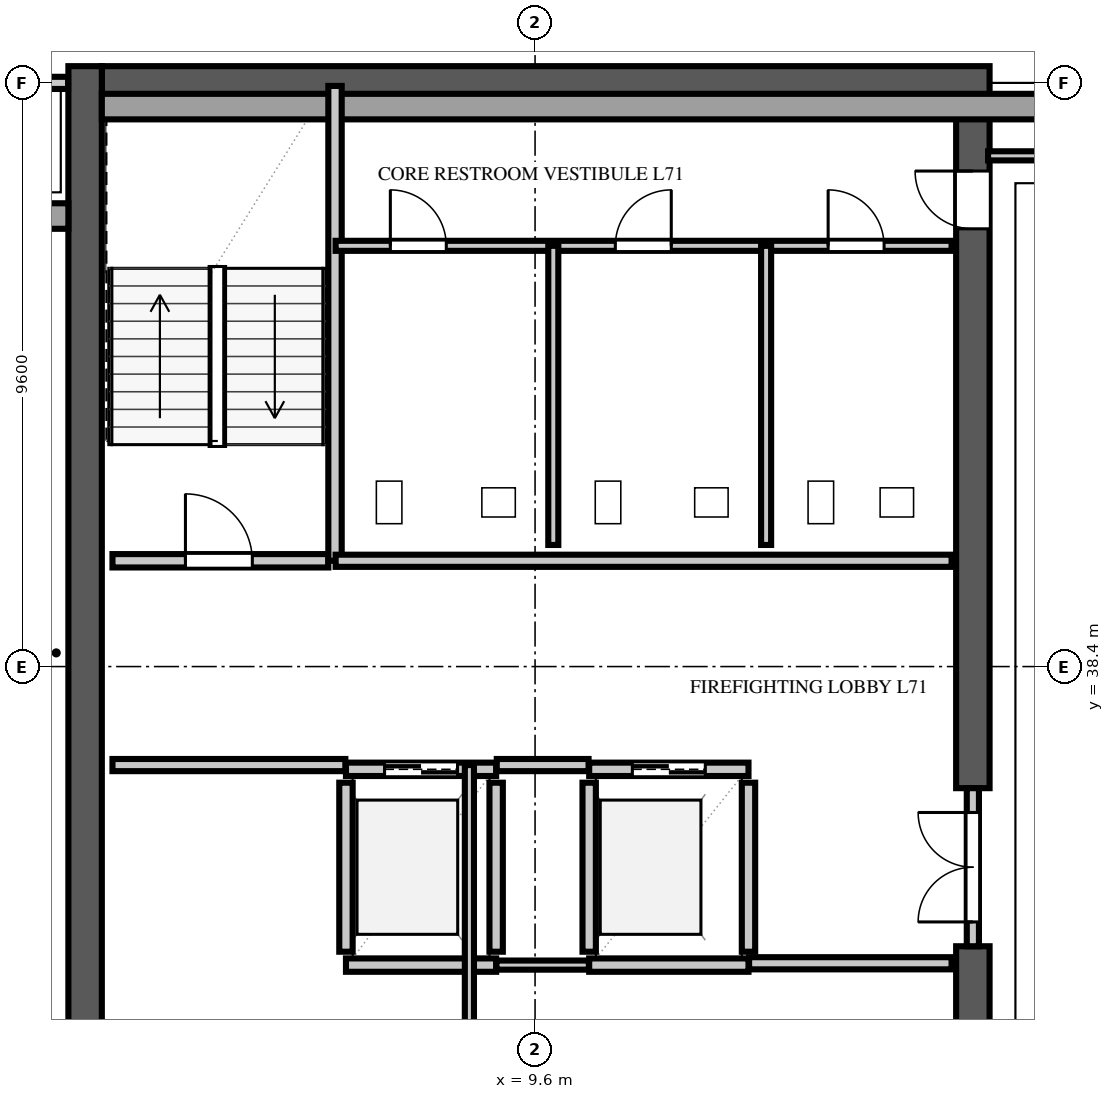
"""IFC4 building model, lengths in metres.
Left out: names, types, materials, properties, quantities, classifications, styles, units other than length and angle.
Written with IfcOpenShell. Run it as: python <this file> out.ifc"""

import sys

from ifc_helpers import new_model, si_unit, direction, frame, frame_2d, origin, place, context, subcontext, project, spatial, rectangle, extrude, element, fill, save


model = new_model("IFC4")
c1 = context("Model", 3, precision=1e-05, world=origin(), true_north=direction((0.0, 1.0)))
c2 = subcontext(c1, "Body", "Model", "MODEL_VIEW")
j1 = project(units=[si_unit("LENGTHUNIT", "METRE"), si_unit("PLANEANGLEUNIT", "RADIAN")], contexts=[c1])
p1 = place(None, origin())
s1 = spatial("IfcSite", under=j1, at=p1, CompositionType="ELEMENT")
p2 = place(p1, origin())
s2 = spatial("IfcBuilding", under=s1, at=p2, CompositionType="ELEMENT")
p3 = place(p2, frame((0.0, 0.0, 281.0)))
s3 = spatial("IfcBuildingStorey", under=s2, at=p3, CompositionType="ELEMENT", Elevation=281.0)
p4 = place(p3, frame((2.475, 48.0, 0.0), z_axis=(0.0, 0.0, 1.0), x_axis=(1.0, 0.0, 0.0)))
e1 = element("IfcWall", 1, at=p4, inside=s3, PredefinedType="SHEAR", context=c2, shape_type="SweptSolid", body=[
    extrude(rectangle(XDim=14.6, YDim=0.55, at=frame_2d((7.3, 0.0))), origin(), (0.0, 0.0, 1.0), 3.54),
])
p5 = place(p3, frame((2.2, 9.325, 0.0), z_axis=(0.0, 0.0, 1.0), x_axis=(0.0, 1.0, 0.0)))
e2 = element("IfcWall", 2, at=p5, inside=s3, PredefinedType="SHEAR", context=c2, shape_type="SweptSolid", body=[
    extrude(rectangle(XDim=38.95, YDim=0.55, at=frame_2d((19.475, 0.0))), origin(), (0.0, 0.0, 1.0), 3.54),
])
p6 = place(p3, frame((16.8, 26.0, 0.0), z_axis=(0.0, 0.0, 1.0), x_axis=(0.0, 1.0, 0.0)))
e3 = element("IfcWall", 3, at=p6, inside=s3, PredefinedType="SHEAR", context=c2, shape_type="SweptSolid", body=[
    extrude(rectangle(XDim=7.8, YDim=0.55, at=frame_2d((3.9, 0.0))), origin(), (0.0, 0.0, 1.0), 3.54),
])
p7 = place(p3, frame((16.8, 36.4, 0.0), z_axis=(0.0, 0.0, 1.0), x_axis=(0.0, 1.0, 0.0)))
e4 = element("IfcWall", 4, at=p7, inside=s3, PredefinedType="SHEAR", context=c2, shape_type="SweptSolid", body=[
    extrude(rectangle(XDim=11.325, YDim=0.55, at=frame_2d((5.663, 0.0))), origin(), (0.0, 0.0, 1.0), 3.54),
])
p8 = place(p7, frame((9.2, 0.0, 0.0)))
e5 = element("IfcOpeningElement", 5, at=p8, cuts=e4, PredefinedType="OPENING", context=c2, shape_type="SweptSolid", body=[
    extrude(rectangle(XDim=0.95, YDim=2.15, at=frame_2d((0.475, 1.075))), frame((0.0, 0.287, 0.0), z_axis=(0.0, -1.0, 0.0), x_axis=(1.0, 0.0, 0.0)), (0.0, 0.0, 1.0), 0.574),
])
p9 = place(p3, frame((36.56, 47.61, 0.0), z_axis=(0.0, 0.0, 1.0), x_axis=(-1.0, 0.0, 0.0)))
e6 = element("IfcWall", 6, at=p9, inside=s3, PredefinedType="SOLIDWALL", context=c2, shape_type="SweptSolid", body=[
    extrude(rectangle(XDim=34.085, YDim=0.42, at=frame_2d((17.042, 0.0))), origin(), (0.0, 0.0, 1.0), 3.54),
])
p10 = place(p9, frame((4.885, 0.0, 0.9)))
e7 = element("IfcOpeningElement", 7, at=p10, cuts=e6, PredefinedType="OPENING", context=c2, shape_type="SweptSolid", body=[
    extrude(rectangle(XDim=0.95, YDim=1.85, at=frame_2d((0.475, 0.925))), frame((0.0, 0.222, 0.0), z_axis=(0.0, -1.0, 0.0), x_axis=(1.0, 0.0, 0.0)), (0.0, 0.0, 1.0), 0.444),
])
p11 = place(p9, frame((9.41, 0.0, 0.9)))
e8 = element("IfcOpeningElement", 8, at=p11, cuts=e6, PredefinedType="OPENING", context=c2, shape_type="SweptSolid", body=[
    extrude(rectangle(XDim=1.5, YDim=1.85, at=frame_2d((0.75, 0.925))), frame((0.0, 0.222, 0.0), z_axis=(0.0, -1.0, 0.0), x_axis=(1.0, 0.0, 0.0)), (0.0, 0.0, 1.0), 0.444),
])
p12 = place(p9, frame((14.485, 0.0, 0.9)))
e9 = element("IfcOpeningElement", 9, at=p12, cuts=e6, PredefinedType="OPENING", context=c2, shape_type="SweptSolid", body=[
    extrude(rectangle(XDim=0.95, YDim=1.85, at=frame_2d((0.475, 0.925))), frame((0.0, 0.222, 0.0), z_axis=(0.0, -1.0, 0.0), x_axis=(1.0, 0.0, 0.0)), (0.0, 0.0, 1.0), 0.444),
])
p13 = place(p3, frame((1.925, 45.81, 0.0), z_axis=(0.0, 0.0, 1.0), x_axis=(-1.0, 0.0, 0.0)))
e10 = element("IfcWall", 10, at=p13, inside=s3, PredefinedType="SOLIDWALL", context=c2, shape_type="SweptSolid", body=[
    extrude(rectangle(XDim=1.885, YDim=0.42, at=frame_2d((0.942, 0.0))), origin(), (0.0, 0.0, 1.0), 3.54),
])
p14 = place(p3, frame((2.65, 40.14, 0.0), z_axis=(0.0, 0.0, 1.0), x_axis=(1.0, 0.0, 0.0)))
e11 = element("IfcWall", 11, at=p14, inside=s3, PredefinedType="SOLIDWALL", context=c2, shape_type="SweptSolid", body=[
    extrude(rectangle(XDim=3.55, YDim=0.22, at=frame_2d((1.775, 0.0))), origin(), (0.0, 0.0, 1.0), 3.54),
])
p15 = place(p14, frame((1.2, 0.0, 0.0)))
e12 = element("IfcOpeningElement", 12, at=p15, cuts=e11, PredefinedType="OPENING", context=c2, shape_type="SweptSolid", body=[
    extrude(rectangle(XDim=1.1, YDim=2.2, at=frame_2d((0.55, 1.1))), frame((0.0, 0.122, 0.0), z_axis=(0.0, -1.0, 0.0), x_axis=(1.0, 0.0, 0.0)), (0.0, 0.0, 1.0), 0.244),
])
p16 = place(p3, frame((6.31, 40.14, 0.0), z_axis=(0.0, 0.0, 1.0), x_axis=(0.0, 1.0, 0.0)))
e13 = element("IfcWall", 13, at=p16, inside=s3, PredefinedType="SOLIDWALL", context=c2, shape_type="SweptSolid", body=[
    extrude(rectangle(XDim=7.81, YDim=0.22, at=frame_2d((3.905, 0.0))), origin(), (0.0, 0.0, 1.0), 3.54),
])
for number, where, z_axis, x_axis in (
    (14, (6.49, 33.71, 0.0), (0.0, 0.0, 1.0), (0.0, 1.0, 0.0)),
    (15, (8.96, 33.71, 0.0), (0.0, 0.0, 1.0), (0.0, 1.0, 0.0)),
):
    element("IfcWall", number, at=place(p3, frame(where, z_axis=z_axis, x_axis=x_axis)), inside=s3, PredefinedType="SOLIDWALL", context=c2, shape_type="SweptSolid", body=[
        extrude(rectangle(XDim=2.78, YDim=0.22, at=frame_2d((1.39, 0.0))), origin(), (0.0, 0.0, 1.0), 3.54),
    ])
p17 = place(p3, frame((6.49, 33.49, 0.0), z_axis=(0.0, 0.0, 1.0), x_axis=(1.0, 0.0, 0.0)))
e16 = element("IfcWall", 16, at=p17, inside=s3, PredefinedType="SOLIDWALL", context=c2, shape_type="SweptSolid", body=[
    extrude(rectangle(XDim=2.47, YDim=0.22, at=frame_2d((1.235, 0.0))), origin(), (0.0, 0.0, 1.0), 3.54),
])
p18 = place(p3, frame((6.49, 36.71, 0.0), z_axis=(0.0, 0.0, 1.0), x_axis=(1.0, 0.0, 0.0)))
e17 = element("IfcWall", 17, at=p18, inside=s3, PredefinedType="SOLIDWALL", context=c2, shape_type="SweptSolid", body=[
    extrude(rectangle(XDim=2.47, YDim=0.22, at=frame_2d((1.235, 0.0))), origin(), (0.0, 0.0, 1.0), 3.54),
])
p19 = place(p18, frame((0.635, 0.0, 0.0)))
e18 = element("IfcOpeningElement", 18, at=p19, cuts=e17, PredefinedType="OPENING", context=c2, shape_type="SweptSolid", body=[
    extrude(rectangle(XDim=1.2, YDim=2.2, at=frame_2d((0.6, 1.1))), frame((0.0, 0.122, 0.0), z_axis=(0.0, -1.0, 0.0), x_axis=(1.0, 0.0, 0.0)), (0.0, 0.0, 1.0), 0.244),
])
for number, where, z_axis, x_axis in (
    (19, (10.49, 33.71, 0.0), (0.0, 0.0, 1.0), (0.0, 1.0, 0.0)),
    (20, (13.11, 33.71, 0.0), (0.0, 0.0, 1.0), (0.0, 1.0, 0.0)),
):
    element("IfcWall", number, at=place(p3, frame(where, z_axis=z_axis, x_axis=x_axis)), inside=s3, PredefinedType="SOLIDWALL", context=c2, shape_type="SweptSolid", body=[
        extrude(rectangle(XDim=2.78, YDim=0.22, at=frame_2d((1.39, 0.0))), origin(), (0.0, 0.0, 1.0), 3.54),
    ])
p20 = place(p3, frame((10.49, 33.49, 0.0), z_axis=(0.0, 0.0, 1.0), x_axis=(1.0, 0.0, 0.0)))
e21 = element("IfcWall", 21, at=p20, inside=s3, PredefinedType="SOLIDWALL", context=c2, shape_type="SweptSolid", body=[
    extrude(rectangle(XDim=2.62, YDim=0.22, at=frame_2d((1.31, 0.0))), origin(), (0.0, 0.0, 1.0), 3.54),
])
p21 = place(p3, frame((10.49, 36.71, 0.0), z_axis=(0.0, 0.0, 1.0), x_axis=(1.0, 0.0, 0.0)))
e22 = element("IfcWall", 22, at=p21, inside=s3, PredefinedType="SOLIDWALL", context=c2, shape_type="SweptSolid", body=[
    extrude(rectangle(XDim=2.62, YDim=0.22, at=frame_2d((1.31, 0.0))), origin(), (0.0, 0.0, 1.0), 3.54),
])
p22 = place(p21, frame((0.71, 0.0, 0.0)))
e23 = element("IfcOpeningElement", 23, at=p22, cuts=e22, PredefinedType="OPENING", context=c2, shape_type="SweptSolid", body=[
    extrude(rectangle(XDim=1.2, YDim=2.2, at=frame_2d((0.6, 1.1))), frame((0.0, 0.122, 0.0), z_axis=(0.0, -1.0, 0.0), x_axis=(1.0, 0.0, 0.0)), (0.0, 0.0, 1.0), 0.244),
])
p23 = place(p3, frame((2.65, 36.78, 0.0), z_axis=(0.0, 0.0, 1.0), x_axis=(1.0, 0.0, 0.0)))
e24 = element("IfcWall", 24, at=p23, inside=s3, PredefinedType="SOLIDWALL", context=c2, shape_type="SweptSolid", body=[
    extrude(rectangle(XDim=3.83, YDim=0.2, at=frame_2d((1.915, 0.0))), origin(), (0.0, 0.0, 1.0), 3.54),
])
p24 = place(p3, frame((8.97, 36.78, 0.0), z_axis=(0.0, 0.0, 1.0), x_axis=(1.0, 0.0, 0.0)))
e25 = element("IfcWall", 25, at=p24, inside=s3, PredefinedType="SOLIDWALL", context=c2, shape_type="SweptSolid", body=[
    extrude(rectangle(XDim=1.51, YDim=0.2, at=frame_2d((0.755, 0.0))), origin(), (0.0, 0.0, 1.0), 3.54),
])
p25 = place(p3, frame((13.12, 33.52, 0.0), z_axis=(0.0, 0.0, 1.0), x_axis=(1.0, 0.0, 0.0)))
e26 = element("IfcWall", 26, at=p25, inside=s3, PredefinedType="SOLIDWALL", context=c2, shape_type="SweptSolid", body=[
    extrude(rectangle(XDim=3.33, YDim=0.2, at=frame_2d((1.665, 0.0))), origin(), (0.0, 0.0, 1.0), 3.54),
])
p26 = place(p3, frame((6.32, 40.14, 0.0), z_axis=(0.0, 0.0, 1.0), x_axis=(1.0, 0.0, 0.0)))
e27 = element("IfcWall", 27, at=p26, inside=s3, PredefinedType="SOLIDWALL", context=c2, shape_type="SweptSolid", body=[
    extrude(rectangle(XDim=10.13, YDim=0.2, at=frame_2d((5.065, 0.0))), origin(), (0.0, 0.0, 1.0), 3.54),
])
p27 = place(p3, frame((16.8, 33.8, 0.0), z_axis=(0.0, 0.0, 1.0), x_axis=(0.0, 1.0, 0.0)))
e28 = element("IfcWall", 28, at=p27, inside=s3, PredefinedType="SOLIDWALL", context=c2, shape_type="SweptSolid", body=[
    extrude(rectangle(XDim=2.6, YDim=0.2, at=frame_2d((1.3, 0.0))), origin(), (0.0, 0.0, 1.0), 3.54),
])
p28 = place(p27, frame((0.4, 0.0, 0.0)))
e29 = element("IfcOpeningElement", 29, at=p28, cuts=e28, PredefinedType="OPENING", context=c2, shape_type="SweptSolid", body=[
    extrude(rectangle(XDim=1.8, YDim=2.2, at=frame_2d((0.9, 1.1))), frame((0.0, 0.112, 0.0), z_axis=(0.0, -1.0, 0.0), x_axis=(1.0, 0.0, 0.0)), (0.0, 0.0, 1.0), 0.224),
])
p29 = place(p3, frame((8.965, 33.49, 0.0), z_axis=(0.0, 0.0, 1.0), x_axis=(1.0, 0.0, 0.0)))
e30 = element("IfcWall", 30, at=p29, inside=s3, PredefinedType="PARTITIONING", context=c2, shape_type="SweptSolid", body=[
    extrude(rectangle(XDim=1.52, YDim=0.15, at=frame_2d((0.76, 0.0))), origin(), (0.0, 0.0, 1.0), 3.54),
])
p30 = place(p3, frame((8.52, 12.02, 0.0), z_axis=(0.0, 0.0, 1.0), x_axis=(0.0, 1.0, 0.0)))
e31 = element("IfcWall", 31, at=p30, inside=s3, PredefinedType="PARTITIONING", context=c2, shape_type="SweptSolid", body=[
    extrude(rectangle(XDim=24.76, YDim=0.15, at=frame_2d((12.38, 0.0))), origin(), (0.0, 0.0, 1.0), 3.54),
])
p31 = place(p30, frame((6.0, 0.0, 0.0)))
e32 = element("IfcOpeningElement", 32, at=p31, cuts=e31, PredefinedType="OPENING", context=c2, shape_type="SweptSolid", body=[
    extrude(rectangle(XDim=0.95, YDim=2.15, at=frame_2d((0.475, 1.075))), frame((0.0, 0.087, 0.0), z_axis=(0.0, -1.0, 0.0), x_axis=(1.0, 0.0, 0.0)), (0.0, 0.0, 1.0), 0.174),
])
p32 = place(p30, frame((14.0, 0.0, 0.0)))
e33 = element("IfcOpeningElement", 33, at=p32, cuts=e31, PredefinedType="OPENING", context=c2, shape_type="SweptSolid", body=[
    extrude(rectangle(XDim=0.95, YDim=2.15, at=frame_2d((0.475, 1.075))), frame((0.0, 0.087, 0.0), z_axis=(0.0, -1.0, 0.0), x_axis=(1.0, 0.0, 0.0)), (0.0, 0.0, 1.0), 0.174),
])
p33 = place(p3, frame((6.32, 45.32, 0.0), z_axis=(0.0, 0.0, 1.0), x_axis=(1.0, 0.0, 0.0)))
e34 = element("IfcWall", 34, at=p33, inside=s3, PredefinedType="PLUMBINGWALL", context=c2, shape_type="SweptSolid", body=[
    extrude(rectangle(XDim=10.13, YDim=0.165, at=frame_2d((5.065, 0.0))), origin(), (0.0, 0.0, 1.0), 3.54),
])
p34 = place(p33, frame((0.9, 0.0, 0.0)))
e35 = element("IfcOpeningElement", 35, at=p34, cuts=e34, PredefinedType="OPENING", context=c2, shape_type="SweptSolid", body=[
    extrude(rectangle(XDim=0.92, YDim=2.15, at=frame_2d((0.46, 1.075))), frame((0.0, 0.094, 0.0), z_axis=(0.0, -1.0, 0.0), x_axis=(1.0, 0.0, 0.0)), (0.0, 0.0, 1.0), 0.189),
])
p35 = place(p33, frame((4.6, 0.0, 0.0)))
e36 = element("IfcOpeningElement", 36, at=p35, cuts=e34, PredefinedType="OPENING", context=c2, shape_type="SweptSolid", body=[
    extrude(rectangle(XDim=0.92, YDim=2.15, at=frame_2d((0.46, 1.075))), frame((0.0, 0.094, 0.0), z_axis=(0.0, -1.0, 0.0), x_axis=(1.0, 0.0, 0.0)), (0.0, 0.0, 1.0), 0.189),
])
p36 = place(p33, frame((8.1, 0.0, 0.0)))
e37 = element("IfcOpeningElement", 37, at=p36, cuts=e34, PredefinedType="OPENING", context=c2, shape_type="SweptSolid", body=[
    extrude(rectangle(XDim=0.92, YDim=2.15, at=frame_2d((0.46, 1.075))), frame((0.0, 0.094, 0.0), z_axis=(0.0, -1.0, 0.0), x_axis=(1.0, 0.0, 0.0)), (0.0, 0.0, 1.0), 0.189),
])
for number, where, z_axis, x_axis in (
    (38, (9.9, 40.4, 0.0), (0.0, 0.0, 1.0), (0.0, 1.0, 0.0)),
    (39, (13.4, 40.4, 0.0), (0.0, 0.0, 1.0), (0.0, 1.0, 0.0)),
):
    element("IfcWall", number, at=place(p3, frame(where, z_axis=z_axis, x_axis=x_axis)), inside=s3, PredefinedType="PLUMBINGWALL", context=c2, shape_type="SweptSolid", body=[
        extrude(rectangle(XDim=4.92, YDim=0.165, at=frame_2d((2.46, 0.0))), origin(), (0.0, 0.0, 1.0), 3.54),
    ])
p37 = place(p3, frame((0.85, 48.0, 0.0), z_axis=(0.0, 0.0, 1.0), x_axis=(1.0, 0.0, 0.0)))
e40 = element("IfcWall", 40, at=p37, inside=s3, PredefinedType="SOLIDWALL", context=c2, shape_type="SweptSolid", body=[
    extrude(rectangle(XDim=1.07, YDim=0.2, at=frame_2d((0.535, 0.0))), origin(), (0.0, 0.0, 1.0), 3.54),
])
p38 = place(p3, frame((17.05, 46.8, 0.0), z_axis=(0.0, 0.0, 1.0), x_axis=(1.0, 0.0, 0.0)))
e41 = element("IfcWall", 41, at=p38, inside=s3, PredefinedType="PARTITIONING", context=c2, shape_type="SweptSolid", body=[
    extrude(rectangle(XDim=2.15, YDim=0.15, at=frame_2d((1.075, 0.0))), origin(), (0.0, 0.0, 1.0), 3.54),
])
p39 = place(p15, origin())
e42 = element("IfcDoor", 42, at=p39, inside=s3, OperationType="SINGLE_SWING_LEFT", PredefinedType="DOOR", context=c2, shape_type="SweptSolid", body=[
    extrude(rectangle(XDim=1.1, YDim=2.2, at=frame_2d((0.55, 1.1))), frame((0.0, 0.025, 0.0), z_axis=(0.0, -1.0, 0.0), x_axis=(1.0, 0.0, 0.0)), (0.0, 0.0, 1.0), 0.05),
])
fill(e12, e42)
p40 = place(p19, origin())
e43 = element("IfcDoor", 43, at=p40, inside=s3, OperationType="DOUBLE_DOOR_SLIDING", PredefinedType="DOOR", context=c2, shape_type="SweptSolid", body=[
    extrude(rectangle(XDim=1.2, YDim=2.2, at=frame_2d((0.6, 1.1))), frame((0.0, 0.025, 0.0), z_axis=(0.0, -1.0, 0.0), x_axis=(1.0, 0.0, 0.0)), (0.0, 0.0, 1.0), 0.05),
])
fill(e18, e43)
p41 = place(p22, origin())
e44 = element("IfcDoor", 44, at=p41, inside=s3, OperationType="DOUBLE_DOOR_SLIDING", PredefinedType="DOOR", context=c2, shape_type="SweptSolid", body=[
    extrude(rectangle(XDim=1.2, YDim=2.2, at=frame_2d((0.6, 1.1))), frame((0.0, 0.025, 0.0), z_axis=(0.0, -1.0, 0.0), x_axis=(1.0, 0.0, 0.0)), (0.0, 0.0, 1.0), 0.05),
])
fill(e23, e44)
p42 = place(p8, origin())
e45 = element("IfcDoor", 45, at=p42, inside=s3, OperationType="SINGLE_SWING_RIGHT", PredefinedType="DOOR", context=c2, shape_type="SweptSolid", body=[
    extrude(rectangle(XDim=0.95, YDim=2.15, at=frame_2d((0.475, 1.075))), frame((0.0, 0.025, 0.0), z_axis=(0.0, -1.0, 0.0), x_axis=(1.0, 0.0, 0.0)), (0.0, 0.0, 1.0), 0.05),
])
fill(e5, e45)
p43 = place(p28, origin())
e46 = element("IfcDoor", 46, at=p43, inside=s3, OperationType="DOUBLE_DOOR_SINGLE_SWING", PredefinedType="DOOR", context=c2, shape_type="SweptSolid", body=[
    extrude(rectangle(XDim=1.8, YDim=2.2, at=frame_2d((0.9, 1.1))), frame((0.0, 0.025, 0.0), z_axis=(0.0, -1.0, 0.0), x_axis=(1.0, 0.0, 0.0)), (0.0, 0.0, 1.0), 0.05),
])
fill(e29, e46)
p44 = place(p34, origin())
e47 = element("IfcDoor", 47, at=p44, inside=s3, OperationType="SINGLE_SWING_LEFT", PredefinedType="DOOR", context=c2, shape_type="SweptSolid", body=[
    extrude(rectangle(XDim=0.92, YDim=2.15, at=frame_2d((0.46, 1.075))), frame((0.0, 0.025, 0.0), z_axis=(0.0, -1.0, 0.0), x_axis=(1.0, 0.0, 0.0)), (0.0, 0.0, 1.0), 0.05),
])
fill(e35, e47)
p45 = place(p35, origin())
e48 = element("IfcDoor", 48, at=p45, inside=s3, OperationType="SINGLE_SWING_RIGHT", PredefinedType="DOOR", context=c2, shape_type="SweptSolid", body=[
    extrude(rectangle(XDim=0.92, YDim=2.15, at=frame_2d((0.46, 1.075))), frame((0.0, 0.025, 0.0), z_axis=(0.0, -1.0, 0.0), x_axis=(1.0, 0.0, 0.0)), (0.0, 0.0, 1.0), 0.05),
])
fill(e36, e48)
p46 = place(p36, origin())
e49 = element("IfcDoor", 49, at=p46, inside=s3, OperationType="SINGLE_SWING_LEFT", PredefinedType="DOOR", context=c2, shape_type="SweptSolid", body=[
    extrude(rectangle(XDim=0.92, YDim=2.15, at=frame_2d((0.46, 1.075))), frame((0.0, 0.025, 0.0), z_axis=(0.0, -1.0, 0.0), x_axis=(1.0, 0.0, 0.0)), (0.0, 0.0, 1.0), 0.05),
])
fill(e37, e49)
save(model, sys.argv[1])
